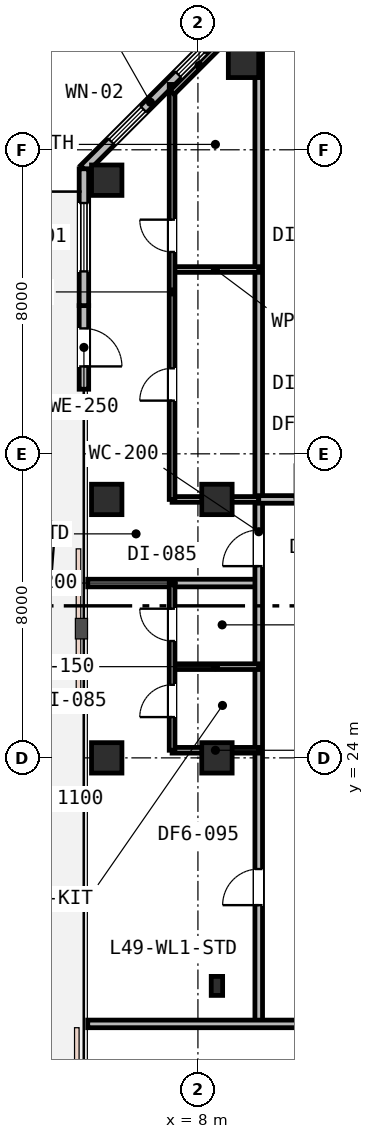
"""IFC4 building model, lengths in metres.
Left out: names, types, materials, properties, quantities, classifications, styles, units other than length and angle.
Written with IfcOpenShell. Run it as: python <this file> out.ifc"""

import sys

from ifc_helpers import new_model, si_unit, direction, frame, frame_2d, origin, origin_2d, place, context, subcontext, project, spatial, rectangle, i_section, extrude, element, fill, save


model = new_model("IFC4")
c1 = context("Model", 3, precision=1e-05, world=origin(), true_north=direction((0.0, 1.0)))
c2 = subcontext(c1, "Body", "Model", "MODEL_VIEW")
j1 = project(units=[si_unit("LENGTHUNIT", "METRE"), si_unit("PLANEANGLEUNIT", "RADIAN")], contexts=[c1])
p1 = place(None, origin())
s1 = spatial("IfcSite", under=j1, at=p1, CompositionType="ELEMENT")
p2 = place(p1, origin())
s2 = spatial("IfcBuilding", under=s1, at=p2, CompositionType="ELEMENT")
p3 = place(p2, frame((0.0, 0.0, 190.2)))
s3 = spatial("IfcBuildingStorey", under=s2, at=p3, CompositionType="ELEMENT", Elevation=190.2)
for number, where, z_axis, x_axis in (
    (1, (8.5, 24.0, 0.0), (0.0, 0.0, 1.0), (1.0, 0.0, 0.0)),
    (2, (5.6, 24.0, 0.0), (0.0, 0.0, 1.0), (1.0, 0.0, 0.0)),
    (3, (5.6, 30.8, 0.0), (0.0, 0.0, 1.0), (1.0, 0.0, 0.0)),
    (4, (5.6, 39.2, 0.0), (0.0, 0.0, 1.0), (1.0, 0.0, 0.0)),
    (5, (8.5, 30.8, 0.0), (0.0, 0.0, 1.0), (1.0, 0.0, 0.0)),
    (6, (9.2, 42.3, 0.0), (0.0, 0.0, 1.0), (1.0, 0.0, 0.0)),
):
    element("IfcColumn", number, at=place(p3, frame(where, z_axis=z_axis, x_axis=x_axis)), inside=s3, PredefinedType="COLUMN", context=c2, shape_type="SweptSolid", body=[
        extrude(rectangle(XDim=0.8, YDim=0.8, at=origin_2d()), origin(), (0.0, 0.0, 1.0), 3.6),
    ])
p4 = place(p3, frame((8.5, 18.0, 0.0), z_axis=(0.0, 0.0, 1.0), x_axis=(1.0, 0.0, 0.0)))
e7 = element("IfcColumn", 7, at=p4, inside=s3, PredefinedType="COLUMN", context=c2, shape_type="SweptSolid", body=[
    extrude(i_section(OverallWidth=0.3, OverallDepth=0.5, WebThickness=0.015, FlangeThickness=0.028, FilletRadius=0.027, at=origin_2d()), origin(), (0.0, 0.0, 1.0), 3.6),
])
p5 = place(p3, frame((8.5, 43.0, 0.0), z_axis=(0.0, 0.0, 1.0), x_axis=(-0.707106781187, -0.707106781187, 0.0)))
e8 = element("IfcWall", 8, at=p5, inside=s3, PredefinedType="STANDARD", context=c2, shape_type="SweptSolid", body=[
    extrude(rectangle(XDim=4.95, YDim=0.25, at=frame_2d((2.475, 0.0))), origin(), (0.0, 0.0, 1.0), 3.33),
])
p6 = place(p5, frame((0.54, 0.0, 0.9)))
e9 = element("IfcOpeningElement", 9, at=p6, cuts=e8, PredefinedType="OPENING", context=c2, shape_type="SweptSolid", body=[
    extrude(rectangle(XDim=0.9, YDim=1.55, at=frame_2d((0.45, 0.775))), frame((0.0, 0.135, 0.0), z_axis=(0.0, -1.0, 0.0), x_axis=(1.0, 0.0, 0.0)), (0.0, 0.0, 1.0), 0.27),
])
p7 = place(p5, frame((2.735, 0.0, 0.85)))
e10 = element("IfcOpeningElement", 10, at=p7, cuts=e8, PredefinedType="OPENING", context=c2, shape_type="SweptSolid", body=[
    extrude(rectangle(XDim=1.2, YDim=1.6, at=frame_2d((0.6, 0.8))), frame((0.0, 0.135, 0.0), z_axis=(0.0, -1.0, 0.0), x_axis=(1.0, 0.0, 0.0)), (0.0, 0.0, 1.0), 0.27),
])
p8 = place(p3, frame((5.0, 35.9, 0.0), z_axis=(0.0, 0.0, 1.0), x_axis=(0.0, -1.0, 0.0)))
e11 = element("IfcWall", 11, at=p8, inside=s3, PredefinedType="STANDARD", context=c2, shape_type="SweptSolid", body=[
    extrude(rectangle(XDim=2.2, YDim=0.25, at=frame_2d((1.1, 0.0))), origin(), (0.0, 0.0, 1.0), 3.33),
])
p9 = place(p8, frame((0.6, 0.0, 0.0)))
e12 = element("IfcOpeningElement", 12, at=p9, cuts=e11, PredefinedType="OPENING", context=c2, shape_type="SweptSolid", body=[
    extrude(rectangle(XDim=1.0, YDim=2.15, at=frame_2d((0.5, 1.075))), frame((0.0, 0.135, 0.0), z_axis=(0.0, -1.0, 0.0), x_axis=(1.0, 0.0, 0.0)), (0.0, 0.0, 1.0), 0.27),
])
p10 = place(p3, frame((5.0, 39.5, 0.0), z_axis=(0.0, 0.0, 1.0), x_axis=(0.0, -1.0, 0.0)))
e13 = element("IfcWall", 13, at=p10, inside=s3, PredefinedType="STANDARD", context=c2, shape_type="SweptSolid", body=[
    extrude(rectangle(XDim=3.6, YDim=0.25, at=frame_2d((1.8, 0.0))), origin(), (0.0, 0.0, 1.0), 3.33),
])
p11 = place(p10, frame((0.9, 0.0, 0.75)))
e14 = element("IfcOpeningElement", 14, at=p11, cuts=e13, PredefinedType="OPENING", context=c2, shape_type="SweptSolid", body=[
    extrude(rectangle(XDim=1.8, YDim=1.85, at=frame_2d((0.9, 0.925))), frame((0.0, 0.135, 0.0), z_axis=(0.0, -1.0, 0.0), x_axis=(1.0, 0.0, 0.0)), (0.0, 0.0, 1.0), 0.27),
])
p12 = place(p3, frame((5.1, 28.6, 0.0), z_axis=(0.0, 0.0, 1.0), x_axis=(1.0, 0.0, 0.0)))
e15 = element("IfcWall", 15, at=p12, inside=s3, PredefinedType="PARTITIONING", context=c2, shape_type="SweptSolid", body=[
    extrude(rectangle(XDim=4.5, YDim=0.2, at=frame_2d((2.25, 0.0))), origin(), (0.0, 0.0, 1.0), 2.92),
])
p13 = place(p3, frame((9.6, 17.0, 0.0), z_axis=(0.0, 0.0, 1.0), x_axis=(0.0, 1.0, 0.0)))
e16 = element("IfcWall", 16, at=p13, inside=s3, PredefinedType="PARTITIONING", context=c2, shape_type="SweptSolid", body=[
    extrude(rectangle(XDim=25.9, YDim=0.2, at=frame_2d((12.95, 0.0))), origin(), (0.0, 0.0, 1.0), 2.92),
])
p14 = place(p13, frame((12.045, 0.0, 0.0)))
e17 = element("IfcOpeningElement", 17, at=p14, cuts=e16, PredefinedType="OPENING", context=c2, shape_type="SweptSolid", body=[
    extrude(rectangle(XDim=0.95, YDim=2.15, at=frame_2d((0.475, 1.075))), frame((0.0, 0.11, 0.0), z_axis=(0.0, -1.0, 0.0), x_axis=(1.0, 0.0, 0.0)), (0.0, 0.0, 1.0), 0.22),
])
p15 = place(p13, frame((3.125, 0.0, 0.0)))
e18 = element("IfcOpeningElement", 18, at=p15, cuts=e16, PredefinedType="OPENING", context=c2, shape_type="SweptSolid", body=[
    extrude(rectangle(XDim=0.95, YDim=2.15, at=frame_2d((0.475, 1.075))), frame((0.0, 0.11, 0.0), z_axis=(0.0, -1.0, 0.0), x_axis=(1.0, 0.0, 0.0)), (0.0, 0.0, 1.0), 0.22),
])
p16 = place(p3, frame((7.32, 30.8, 0.0), z_axis=(0.0, 0.0, 1.0), x_axis=(1.0, 0.0, 0.0)))
e19 = element("IfcWall", 19, at=p16, inside=s3, PredefinedType="PARTITIONING", context=c2, shape_type="SweptSolid", body=[
    extrude(rectangle(XDim=2.28, YDim=0.15, at=frame_2d((1.14, 0.0))), origin(), (0.0, 0.0, 1.0), 2.92),
])
p17 = place(p3, frame((7.32, 36.85, 0.0), z_axis=(0.0, 0.0, 1.0), x_axis=(1.0, 0.0, 0.0)))
e20 = element("IfcWall", 20, at=p17, inside=s3, PredefinedType="PARTITIONING", context=c2, shape_type="SweptSolid", body=[
    extrude(rectangle(XDim=2.28, YDim=0.15, at=frame_2d((1.14, 0.0))), origin(), (0.0, 0.0, 1.0), 3.33),
])
p18 = place(p3, frame((7.32, 30.8, 0.0), z_axis=(0.0, 0.0, 1.0), x_axis=(0.0, 1.0, 0.0)))
e21 = element("IfcWall", 21, at=p18, inside=s3, PredefinedType="PARTITIONING", context=c2, shape_type="SweptSolid", body=[
    extrude(rectangle(XDim=10.92, YDim=0.15, at=frame_2d((5.46, 0.0))), origin(), (0.0, 0.0, 1.0), 2.92),
])
p19 = place(p18, frame((2.6, 0.0, 0.0)))
e22 = element("IfcOpeningElement", 22, at=p19, cuts=e21, PredefinedType="OPENING", context=c2, shape_type="SweptSolid", body=[
    extrude(rectangle(XDim=0.85, YDim=2.15, at=frame_2d((0.425, 1.075))), frame((0.0, 0.085, 0.0), z_axis=(0.0, -1.0, 0.0), x_axis=(1.0, 0.0, 0.0)), (0.0, 0.0, 1.0), 0.17),
])
p20 = place(p18, frame((6.512, 0.0, 0.0)))
e23 = element("IfcOpeningElement", 23, at=p20, cuts=e21, PredefinedType="OPENING", context=c2, shape_type="SweptSolid", body=[
    extrude(rectangle(XDim=0.85, YDim=2.15, at=frame_2d((0.425, 1.075))), frame((0.0, 0.085, 0.0), z_axis=(0.0, -1.0, 0.0), x_axis=(1.0, 0.0, 0.0)), (0.0, 0.0, 1.0), 0.17),
])
p21 = place(p3, frame((7.32, 41.509, 0.0), z_axis=(0.0, 0.0, 1.0), x_axis=(0.707106781187, 0.707106781187, 0.0)))
e24 = element("IfcWall", 24, at=p21, inside=s3, PredefinedType="PARTITIONING", context=c2, shape_type="SweptSolid", body=[
    extrude(rectangle(XDim=2.009, YDim=0.15, at=frame_2d((1.004, 0.0))), origin(), (0.0, 0.0, 1.0), 3.33),
])
p22 = place(p3, frame((9.6, 30.8, 0.0), z_axis=(0.0, 0.0, 1.0), x_axis=(1.0, 0.0, 0.0)))
e25 = element("IfcWall", 25, at=p22, inside=s3, PredefinedType="PARTITIONING", context=c2, shape_type="SweptSolid", body=[
    extrude(rectangle(XDim=6.3, YDim=0.2, at=frame_2d((3.15, 0.0))), origin(), (0.0, 0.0, 1.0), 2.92),
])
p23 = place(p22, frame((0.95, 0.0, 0.0)))
e26 = element("IfcOpeningElement", 26, at=p23, cuts=e25, PredefinedType="OPENING", context=c2, shape_type="SweptSolid", body=[
    extrude(rectangle(XDim=0.95, YDim=2.15, at=frame_2d((0.475, 1.075))), frame((0.0, 0.11, 0.0), z_axis=(0.0, -1.0, 0.0), x_axis=(1.0, 0.0, 0.0)), (0.0, 0.0, 1.0), 0.22),
])
p24 = place(p22, frame((4.1, 0.0, 0.0)))
e27 = element("IfcOpeningElement", 27, at=p24, cuts=e25, PredefinedType="OPENING", context=c2, shape_type="SweptSolid", body=[
    extrude(rectangle(XDim=0.95, YDim=2.15, at=frame_2d((0.475, 1.075))), frame((0.0, 0.11, 0.0), z_axis=(0.0, -1.0, 0.0), x_axis=(1.0, 0.0, 0.0)), (0.0, 0.0, 1.0), 0.22),
])
p25 = place(p3, frame((5.1, 17.0, 0.0), z_axis=(0.0, 0.0, 1.0), x_axis=(1.0, 0.0, 0.0)))
e28 = element("IfcWall", 28, at=p25, inside=s3, PredefinedType="PARTITIONING", context=c2, shape_type="SweptSolid", body=[
    extrude(rectangle(XDim=18.8, YDim=0.2, at=frame_2d((9.4, 0.0))), origin(), (0.0, 0.0, 1.0), 2.92),
])
p26 = place(p25, frame((7.975, 0.0, 0.0)))
e29 = element("IfcOpeningElement", 29, at=p26, cuts=e28, PredefinedType="OPENING", context=c2, shape_type="SweptSolid", body=[
    extrude(rectangle(XDim=0.95, YDim=2.15, at=frame_2d((0.475, 1.075))), frame((0.0, 0.11, 0.0), z_axis=(0.0, -1.0, 0.0), x_axis=(1.0, 0.0, 0.0)), (0.0, 0.0, 1.0), 0.22),
])
for number, where, z_axis, x_axis in (
    (30, (7.32, 24.2, 0.0), (0.0, 0.0, 1.0), (1.0, 0.0, 0.0)),
    (31, (7.32, 26.4, 0.0), (0.0, 0.0, 1.0), (1.0, 0.0, 0.0)),
):
    element("IfcWall", number, at=place(p3, frame(where, z_axis=z_axis, x_axis=x_axis)), inside=s3, PredefinedType="PARTITIONING", context=c2, shape_type="SweptSolid", body=[
        extrude(rectangle(XDim=2.28, YDim=0.15, at=frame_2d((1.14, 0.0))), origin(), (0.0, 0.0, 1.0), 2.92),
    ])
p27 = place(p3, frame((7.32, 24.2, 0.0), z_axis=(0.0, 0.0, 1.0), x_axis=(0.0, 1.0, 0.0)))
e32 = element("IfcWall", 32, at=p27, inside=s3, PredefinedType="PARTITIONING", context=c2, shape_type="SweptSolid", body=[
    extrude(rectangle(XDim=4.4, YDim=0.15, at=frame_2d((2.2, 0.0))), origin(), (0.0, 0.0, 1.0), 2.92),
])
p28 = place(p27, frame((0.873, 0.0, 0.0)))
e33 = element("IfcOpeningElement", 33, at=p28, cuts=e32, PredefinedType="OPENING", context=c2, shape_type="SweptSolid", body=[
    extrude(rectangle(XDim=0.85, YDim=2.15, at=frame_2d((0.425, 1.075))), frame((0.0, 0.085, 0.0), z_axis=(0.0, -1.0, 0.0), x_axis=(1.0, 0.0, 0.0)), (0.0, 0.0, 1.0), 0.17),
])
p29 = place(p27, frame((2.875, 0.0, 0.0)))
e34 = element("IfcOpeningElement", 34, at=p29, cuts=e32, PredefinedType="OPENING", context=c2, shape_type="SweptSolid", body=[
    extrude(rectangle(XDim=0.85, YDim=2.15, at=frame_2d((0.425, 1.075))), frame((0.0, 0.085, 0.0), z_axis=(0.0, -1.0, 0.0), x_axis=(1.0, 0.0, 0.0)), (0.0, 0.0, 1.0), 0.17),
])
p30 = place(p6, origin())
e35 = element("IfcWindow", 35, at=p30, inside=s3, PartitioningType="SINGLE_PANEL", PredefinedType="WINDOW", context=c2, shape_type="SweptSolid", body=[
    extrude(rectangle(XDim=0.9, YDim=1.55, at=frame_2d((0.45, 0.775))), frame((0.0, 0.03, 0.0), z_axis=(0.0, -1.0, 0.0), x_axis=(1.0, 0.0, 0.0)), (0.0, 0.0, 1.0), 0.06),
])
fill(e9, e35)
p31 = place(p7, origin())
e36 = element("IfcWindow", 36, at=p31, inside=s3, PartitioningType="SINGLE_PANEL", PredefinedType="WINDOW", context=c2, shape_type="SweptSolid", body=[
    extrude(rectangle(XDim=1.2, YDim=1.6, at=frame_2d((0.6, 0.8))), frame((0.0, 0.03, 0.0), z_axis=(0.0, -1.0, 0.0), x_axis=(1.0, 0.0, 0.0)), (0.0, 0.0, 1.0), 0.06),
])
fill(e10, e36)
p32 = place(p9, origin())
e37 = element("IfcDoor", 37, at=p32, inside=s3, OperationType="SINGLE_SWING_RIGHT", PredefinedType="DOOR", context=c2, shape_type="SweptSolid", body=[
    extrude(rectangle(XDim=1.0, YDim=2.15, at=frame_2d((0.5, 1.075))), frame((0.0, 0.025, 0.0), z_axis=(0.0, -1.0, 0.0), x_axis=(1.0, 0.0, 0.0)), (0.0, 0.0, 1.0), 0.05),
])
fill(e12, e37)
p33 = place(p11, origin())
e38 = element("IfcWindow", 38, at=p33, inside=s3, PartitioningType="SINGLE_PANEL", PredefinedType="WINDOW", context=c2, shape_type="SweptSolid", body=[
    extrude(rectangle(XDim=1.8, YDim=1.85, at=frame_2d((0.9, 0.925))), frame((0.0, 0.03, 0.0), z_axis=(0.0, -1.0, 0.0), x_axis=(1.0, 0.0, 0.0)), (0.0, 0.0, 1.0), 0.06),
])
fill(e14, e38)
p34 = place(p14, origin())
e39 = element("IfcDoor", 39, at=p34, inside=s3, OperationType="SINGLE_SWING_LEFT", PredefinedType="DOOR", context=c2, shape_type="SweptSolid", body=[
    extrude(rectangle(XDim=0.95, YDim=2.15, at=frame_2d((0.475, 1.075))), frame((0.0, 0.025, 0.0), z_axis=(0.0, -1.0, 0.0), x_axis=(1.0, 0.0, 0.0)), (0.0, 0.0, 1.0), 0.05),
])
fill(e17, e39)
p35 = place(p19, origin())
e40 = element("IfcDoor", 40, at=p35, inside=s3, OperationType="SINGLE_SWING_LEFT", PredefinedType="DOOR", context=c2, shape_type="SweptSolid", body=[
    extrude(rectangle(XDim=0.85, YDim=2.15, at=frame_2d((0.425, 1.075))), frame((0.0, 0.025, 0.0), z_axis=(0.0, -1.0, 0.0), x_axis=(1.0, 0.0, 0.0)), (0.0, 0.0, 1.0), 0.05),
])
fill(e22, e40)
p36 = place(p20, origin())
e41 = element("IfcDoor", 41, at=p36, inside=s3, OperationType="SINGLE_SWING_RIGHT", PredefinedType="DOOR", context=c2, shape_type="SweptSolid", body=[
    extrude(rectangle(XDim=0.85, YDim=2.15, at=frame_2d((0.425, 1.075))), frame((0.0, 0.025, 0.0), z_axis=(0.0, -1.0, 0.0), x_axis=(1.0, 0.0, 0.0)), (0.0, 0.0, 1.0), 0.05),
])
fill(e23, e41)
p37 = place(p15, origin())
e42 = element("IfcDoor", 42, at=p37, inside=s3, OperationType="SINGLE_SWING_LEFT", PredefinedType="DOOR", context=c2, shape_type="SweptSolid", body=[
    extrude(rectangle(XDim=0.95, YDim=2.15, at=frame_2d((0.475, 1.075))), frame((0.0, 0.025, 0.0), z_axis=(0.0, -1.0, 0.0), x_axis=(1.0, 0.0, 0.0)), (0.0, 0.0, 1.0), 0.05),
])
fill(e18, e42)
p38 = place(p28, origin())
e43 = element("IfcDoor", 43, at=p38, inside=s3, OperationType="SINGLE_SWING_LEFT", PredefinedType="DOOR", context=c2, shape_type="SweptSolid", body=[
    extrude(rectangle(XDim=0.85, YDim=2.15, at=frame_2d((0.425, 1.075))), frame((0.0, 0.025, 0.0), z_axis=(0.0, -1.0, 0.0), x_axis=(1.0, 0.0, 0.0)), (0.0, 0.0, 1.0), 0.05),
])
fill(e33, e43)
p39 = place(p29, origin())
e44 = element("IfcDoor", 44, at=p39, inside=s3, OperationType="SINGLE_SWING_RIGHT", PredefinedType="DOOR", context=c2, shape_type="SweptSolid", body=[
    extrude(rectangle(XDim=0.85, YDim=2.15, at=frame_2d((0.425, 1.075))), frame((0.0, 0.025, 0.0), z_axis=(0.0, -1.0, 0.0), x_axis=(1.0, 0.0, 0.0)), (0.0, 0.0, 1.0), 0.05),
])
fill(e34, e44)
save(model, sys.argv[1])
